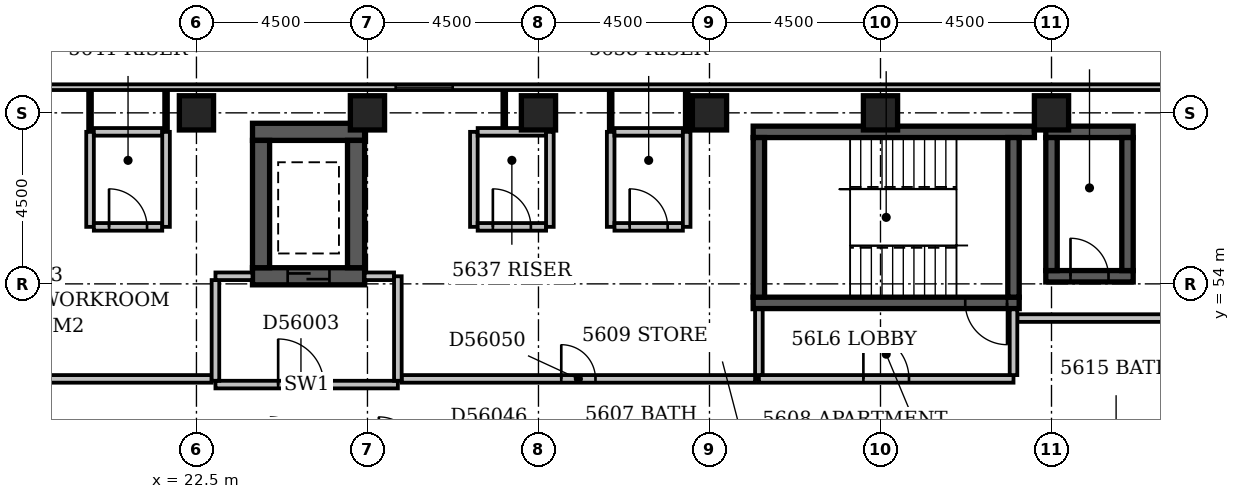
"""IFC4 building model, lengths in metres.
Left out: names, types, materials, properties, quantities, classifications, styles, units other than length and angle.
Written with IfcOpenShell. Run it as: python <this file> out.ifc"""

import sys

from ifc_helpers import new_model, si_unit, direction, frame, frame_2d, origin, origin_2d, place, context, subcontext, project, spatial, rectangle, extrude, element, fill, save


model = new_model("IFC4")
c1 = context("Model", 3, precision=1e-05, world=origin(), true_north=direction((0.0, 1.0)))
c2 = subcontext(c1, "Body", "Model", "MODEL_VIEW")
j1 = project(units=[si_unit("LENGTHUNIT", "METRE"), si_unit("PLANEANGLEUNIT", "RADIAN")], contexts=[c1])
p1 = place(None, origin())
s1 = spatial("IfcSite", under=j1, at=p1, CompositionType="ELEMENT")
p2 = place(p1, origin())
s2 = spatial("IfcBuilding", under=s1, at=p2, CompositionType="ELEMENT")
p3 = place(p2, frame((0.0, 0.0, 218.6)))
s3 = spatial("IfcBuildingStorey", under=s2, at=p3, CompositionType="ELEMENT", Elevation=218.6)
p4 = place(p3, frame((23.975, 54.2, -0.3), z_axis=(0.0, 0.0, 1.0), x_axis=(1.0, 0.0, 0.0)))
e1 = element("IfcWall", 1, at=p4, inside=s3, PredefinedType="SHEAR", context=c2, shape_type="SweptSolid", body=[
    extrude(rectangle(XDim=2.95, YDim=0.45, at=frame_2d((1.475, 0.0))), origin(), (0.0, 0.0, 1.0), 3.6),
])
p5 = place(p4, frame((0.925, 0.0, 0.3)))
e2 = element("IfcOpeningElement", 2, at=p5, cuts=e1, PredefinedType="OPENING", context=c2, shape_type="SweptSolid", body=[
    extrude(rectangle(XDim=1.1, YDim=2.1, at=frame_2d((0.55, 1.05))), frame((0.0, 0.237, 0.0), z_axis=(0.0, -1.0, 0.0), x_axis=(1.0, 0.0, 0.0)), (0.0, 0.0, 1.0), 0.474),
])
p6 = place(p3, frame((23.975, 58.0, -0.3), z_axis=(0.0, 0.0, 1.0), x_axis=(1.0, 0.0, 0.0)))
e3 = element("IfcWall", 3, at=p6, inside=s3, PredefinedType="SHEAR", context=c2, shape_type="SweptSolid", body=[
    extrude(rectangle(XDim=2.95, YDim=0.45, at=frame_2d((1.475, 0.0))), origin(), (0.0, 0.0, 1.0), 3.6),
])
for number, where, z_axis, x_axis in (
    (4, (24.2, 54.425, -0.3), (0.0, 0.0, 1.0), (0.0, 1.0, 0.0)),
    (5, (26.7, 54.425, -0.3), (0.0, 0.0, 1.0), (0.0, 1.0, 0.0)),
):
    element("IfcWall", number, at=place(p3, frame(where, z_axis=z_axis, x_axis=x_axis)), inside=s3, PredefinedType="SHEAR", context=c2, shape_type="SweptSolid", body=[
        extrude(rectangle(XDim=3.35, YDim=0.45, at=frame_2d((1.675, 0.0))), origin(), (0.0, 0.0, 1.0), 3.6),
    ])
p7 = place(p3, frame((37.15, 53.5, -0.3), z_axis=(0.0, 0.0, 1.0), x_axis=(1.0, 0.0, 0.0)))
e6 = element("IfcWall", 6, at=p7, inside=s3, PredefinedType="SHEAR", context=c2, shape_type="SweptSolid", body=[
    extrude(rectangle(XDim=7.0, YDim=0.3, at=frame_2d((3.5, 0.0))), origin(), (0.0, 0.0, 1.0), 3.6),
])
p8 = place(p7, frame((5.58, 0.0, 0.3)))
e7 = element("IfcOpeningElement", 7, at=p8, cuts=e6, PredefinedType="OPENING", context=c2, shape_type="SweptSolid", body=[
    extrude(rectangle(XDim=1.1, YDim=2.1, at=frame_2d((0.55, 1.05))), frame((0.0, 0.162, 0.0), z_axis=(0.0, -1.0, 0.0), x_axis=(1.0, 0.0, 0.0)), (0.0, 0.0, 1.0), 0.324),
])
p9 = place(p3, frame((37.15, 58.0, -0.3), z_axis=(0.0, 0.0, 1.0), x_axis=(1.0, 0.0, 0.0)))
e8 = element("IfcWall", 8, at=p9, inside=s3, PredefinedType="SHEAR", context=c2, shape_type="SweptSolid", body=[
    extrude(rectangle(XDim=7.4, YDim=0.3, at=frame_2d((3.7, 0.0))), origin(), (0.0, 0.0, 1.0), 3.6),
])
for number, where, z_axis, x_axis in (
    (9, (37.3, 53.65, -0.3), (0.0, 0.0, 1.0), (0.0, 1.0, 0.0)),
    (10, (44.0, 53.65, -0.3), (0.0, 0.0, 1.0), (0.0, 1.0, 0.0)),
):
    element("IfcWall", number, at=place(p3, frame(where, z_axis=z_axis, x_axis=x_axis)), inside=s3, PredefinedType="SHEAR", context=c2, shape_type="SweptSolid", body=[
        extrude(rectangle(XDim=4.2, YDim=0.3, at=frame_2d((2.1, 0.0))), origin(), (0.0, 0.0, 1.0), 3.6),
    ])
p10 = place(p3, frame((44.85, 54.2, -0.3), z_axis=(0.0, 0.0, 1.0), x_axis=(1.0, 0.0, 0.0)))
e11 = element("IfcWall", 11, at=p10, inside=s3, PredefinedType="SHEAR", context=c2, shape_type="SweptSolid", body=[
    extrude(rectangle(XDim=2.3, YDim=0.3, at=frame_2d((1.15, 0.0))), origin(), (0.0, 0.0, 1.0), 3.6),
])
p11 = place(p10, frame((0.65, 0.0, 0.3)))
e12 = element("IfcOpeningElement", 12, at=p11, cuts=e11, PredefinedType="OPENING", context=c2, shape_type="SweptSolid", body=[
    extrude(rectangle(XDim=1.0, YDim=2.1, at=frame_2d((0.5, 1.05))), frame((0.0, 0.162, 0.0), z_axis=(0.0, -1.0, 0.0), x_axis=(1.0, 0.0, 0.0)), (0.0, 0.0, 1.0), 0.324),
])
p12 = place(p3, frame((44.85, 58.0, -0.3), z_axis=(0.0, 0.0, 1.0), x_axis=(1.0, 0.0, 0.0)))
e13 = element("IfcWall", 13, at=p12, inside=s3, PredefinedType="SHEAR", context=c2, shape_type="SweptSolid", body=[
    extrude(rectangle(XDim=2.3, YDim=0.3, at=frame_2d((1.15, 0.0))), origin(), (0.0, 0.0, 1.0), 3.6),
])
for number, where, z_axis, x_axis in (
    (14, (45.0, 54.35, -0.3), (0.0, 0.0, 1.0), (0.0, 1.0, 0.0)),
    (15, (47.0, 54.35, -0.3), (0.0, 0.0, 1.0), (0.0, 1.0, 0.0)),
):
    element("IfcWall", number, at=place(p3, frame(where, z_axis=z_axis, x_axis=x_axis)), inside=s3, PredefinedType="SHEAR", context=c2, shape_type="SweptSolid", body=[
        extrude(rectangle(XDim=3.5, YDim=0.3, at=frame_2d((1.75, 0.0))), origin(), (0.0, 0.0, 1.0), 3.6),
    ])
for number, where, z_axis, x_axis in (
    (16, (22.5, 58.5, -0.3), (0.0, 0.0, 1.0), (1.0, 0.0, 0.0)),
    (17, (27.0, 58.5, -0.3), (0.0, 0.0, 1.0), (1.0, 0.0, 0.0)),
    (18, (31.5, 58.5, -0.3), (0.0, 0.0, 1.0), (1.0, 0.0, 0.0)),
    (19, (36.0, 58.5, -0.3), (0.0, 0.0, 1.0), (1.0, 0.0, 0.0)),
    (20, (40.5, 58.5, -0.3), (0.0, 0.0, 1.0), (1.0, 0.0, 0.0)),
    (21, (45.0, 58.5, -0.3), (0.0, 0.0, 1.0), (1.0, 0.0, 0.0)),
):
    element("IfcColumn", number, at=place(p3, frame(where, z_axis=z_axis, x_axis=x_axis)), inside=s3, PredefinedType="COLUMN", context=c2, shape_type="SweptSolid", body=[
        extrude(rectangle(XDim=0.9, YDim=0.9, at=origin_2d()), origin(), (0.0, 0.0, 1.0), 3.6),
    ])
p13 = place(p3, frame((50.1, 59.175, 0.0), z_axis=(0.0, 0.0, 1.0), x_axis=(-1.0, 0.0, 0.0)))
e22 = element("IfcWall", 22, at=p13, inside=s3, PredefinedType="STANDARD", context=c2, shape_type="SweptSolid", body=[
    extrude(rectangle(XDim=50.85, YDim=0.15, at=frame_2d((25.425, 0.0))), origin(), (0.0, 0.0, 1.0), 2.7),
])
p14 = place(p13, frame((20.857, 0.0, 0.6)))
e23 = element("IfcOpeningElement", 23, at=p14, cuts=e22, PredefinedType="OPENING", context=c2, shape_type="SweptSolid", body=[
    extrude(rectangle(XDim=1.5, YDim=1.8, at=frame_2d((0.75, 0.9))), frame((0.0, 0.087, 0.0), z_axis=(0.0, -1.0, 0.0), x_axis=(1.0, 0.0, 0.0)), (0.0, 0.0, 1.0), 0.174),
])
p15 = place(p3, frame((23.0, 51.35, 0.0), z_axis=(0.0, 0.0, 1.0), x_axis=(1.0, 0.0, 0.0)))
e24 = element("IfcWall", 24, at=p15, inside=s3, PredefinedType="PARTITIONING", context=c2, shape_type="SweptSolid", body=[
    extrude(rectangle(XDim=4.8, YDim=0.2, at=frame_2d((2.4, 0.0))), origin(), (0.0, 0.0, 1.0), 3.3),
])
p16 = place(p15, frame((1.65, 0.0, 0.0)))
e25 = element("IfcOpeningElement", 25, at=p16, cuts=e24, PredefinedType="OPENING", context=c2, shape_type="SweptSolid", body=[
    extrude(rectangle(XDim=1.2, YDim=2.1, at=frame_2d((0.6, 1.05))), frame((0.0, 0.112, 0.0), z_axis=(0.0, -1.0, 0.0), x_axis=(1.0, 0.0, 0.0)), (0.0, 0.0, 1.0), 0.224),
])
p17 = place(p3, frame((27.8, 51.45, 0.0), z_axis=(0.0, 0.0, 1.0), x_axis=(0.0, 1.0, 0.0)))
e26 = element("IfcWall", 26, at=p17, inside=s3, PredefinedType="PARTITIONING", context=c2, shape_type="SweptSolid", body=[
    extrude(rectangle(XDim=2.75, YDim=0.2, at=frame_2d((1.375, 0.0))), origin(), (0.0, 0.0, 1.0), 3.3),
])
p18 = place(p3, frame((23.0, 54.2, 0.0), z_axis=(0.0, 0.0, 1.0), x_axis=(1.0, 0.0, 0.0)))
e27 = element("IfcWall", 27, at=p18, inside=s3, PredefinedType="PARTITIONING", context=c2, shape_type="SweptSolid", body=[
    extrude(rectangle(XDim=0.975, YDim=0.2, at=frame_2d((0.488, 0.0))), origin(), (0.0, 0.0, 1.0), 3.3),
])
p19 = place(p3, frame((26.925, 54.2, 0.0), z_axis=(0.0, 0.0, 1.0), x_axis=(1.0, 0.0, 0.0)))
e28 = element("IfcWall", 28, at=p19, inside=s3, PredefinedType="PARTITIONING", context=c2, shape_type="SweptSolid", body=[
    extrude(rectangle(XDim=0.775, YDim=0.2, at=frame_2d((0.387, 0.0))), origin(), (0.0, 0.0, 1.0), 3.3),
])
p20 = place(p3, frame((23.0, 51.45, 0.0), z_axis=(0.0, 0.0, 1.0), x_axis=(0.0, 1.0, 0.0)))
e29 = element("IfcWall", 29, at=p20, inside=s3, PredefinedType="PARTITIONING", context=c2, shape_type="SweptSolid", body=[
    extrude(rectangle(XDim=2.65, YDim=0.2, at=frame_2d((1.325, 0.0))), origin(), (0.0, 0.0, 1.0), 3.3),
])
p21 = place(p3, frame((37.3, 51.5, 0.0), z_axis=(0.0, 0.0, 1.0), x_axis=(1.0, 0.0, 0.0)))
e30 = element("IfcWall", 30, at=p21, inside=s3, PredefinedType="PARTITIONING", context=c2, shape_type="SweptSolid", body=[
    extrude(rectangle(XDim=6.7, YDim=0.2, at=frame_2d((3.35, 0.0))), origin(), (0.0, 0.0, 1.0), 3.3),
])
p22 = place(p21, frame((2.75, 0.0, 0.0)))
e31 = element("IfcOpeningElement", 31, at=p22, cuts=e30, PredefinedType="OPENING", context=c2, shape_type="SweptSolid", body=[
    extrude(rectangle(XDim=1.2, YDim=2.1, at=frame_2d((0.6, 1.05))), frame((0.0, 0.112, 0.0), z_axis=(0.0, -1.0, 0.0), x_axis=(1.0, 0.0, 0.0)), (0.0, 0.0, 1.0), 0.224),
])
for number, where, z_axis, x_axis in (
    (32, (44.0, 51.6, 0.0), (0.0, 0.0, 1.0), (0.0, 1.0, 0.0)),
    (33, (37.3, 51.6, 0.0), (0.0, 0.0, 1.0), (0.0, 1.0, 0.0)),
):
    element("IfcWall", number, at=place(p3, frame(where, z_axis=z_axis, x_axis=x_axis)), inside=s3, PredefinedType="PARTITIONING", context=c2, shape_type="SweptSolid", body=[
        extrude(rectangle(XDim=1.73, YDim=0.2, at=frame_2d((0.865, 0.0))), origin(), (0.0, 0.0, 1.0), 3.3),
    ])
p23 = place(p3, frame((7.6, 51.5, 0.0), z_axis=(0.0, 0.0, 1.0), x_axis=(1.0, 0.0, 0.0)))
e34 = element("IfcWall", 34, at=p23, inside=s3, PredefinedType="PARTITIONING", context=c2, shape_type="SweptSolid", body=[
    extrude(rectangle(XDim=15.3, YDim=0.2, at=frame_2d((7.65, 0.0))), origin(), (0.0, 0.0, 1.0), 3.3),
])
p24 = place(p23, frame((7.2, 0.0, 0.0)))
e35 = element("IfcOpeningElement", 35, at=p24, cuts=e34, PredefinedType="OPENING", context=c2, shape_type="SweptSolid", body=[
    extrude(rectangle(XDim=0.9, YDim=2.1, at=frame_2d((0.45, 1.05))), frame((0.0, 0.112, 0.0), z_axis=(0.0, -1.0, 0.0), x_axis=(1.0, 0.0, 0.0)), (0.0, 0.0, 1.0), 0.224),
])
p25 = place(p3, frame((27.9, 51.5, 0.0), z_axis=(0.0, 0.0, 1.0), x_axis=(1.0, 0.0, 0.0)))
e36 = element("IfcWall", 36, at=p25, inside=s3, PredefinedType="PARTITIONING", context=c2, shape_type="SweptSolid", body=[
    extrude(rectangle(XDim=9.3, YDim=0.2, at=frame_2d((4.65, 0.0))), origin(), (0.0, 0.0, 1.0), 3.3),
])
p26 = place(p25, frame((4.2, 0.0, 0.0)))
e37 = element("IfcOpeningElement", 37, at=p26, cuts=e36, PredefinedType="OPENING", context=c2, shape_type="SweptSolid", body=[
    extrude(rectangle(XDim=0.9, YDim=2.1, at=frame_2d((0.45, 1.05))), frame((0.0, 0.112, 0.0), z_axis=(0.0, -1.0, 0.0), x_axis=(1.0, 0.0, 0.0)), (0.0, 0.0, 1.0), 0.224),
])
p27 = place(p3, frame((44.1, 53.1, 0.0), z_axis=(0.0, 0.0, 1.0), x_axis=(1.0, 0.0, 0.0)))
e38 = element("IfcWall", 38, at=p27, inside=s3, PredefinedType="PARTITIONING", context=c2, shape_type="SweptSolid", body=[
    extrude(rectangle(XDim=10.5, YDim=0.2, at=frame_2d((5.25, 0.0))), origin(), (0.0, 0.0, 1.0), 3.3),
])
p28 = place(p27, frame((4.45, 0.0, 0.0)))
e39 = element("IfcOpeningElement", 39, at=p28, cuts=e38, PredefinedType="OPENING", context=c2, shape_type="SweptSolid", body=[
    extrude(rectangle(XDim=0.9, YDim=2.1, at=frame_2d((0.45, 1.05))), frame((0.0, 0.112, 0.0), z_axis=(0.0, -1.0, 0.0), x_axis=(1.0, 0.0, 0.0)), (0.0, 0.0, 1.0), 0.224),
])
p29 = place(p3, frame((19.7, 55.5, 0.0), z_axis=(0.0, 0.0, 1.0), x_axis=(0.0, 1.0, 0.0)))
e40 = element("IfcWall", 40, at=p29, inside=s3, PredefinedType="PARTITIONING", context=c2, shape_type="SweptSolid", body=[
    extrude(rectangle(XDim=2.5, YDim=0.2, at=frame_2d((1.25, 0.0))), origin(), (0.0, 0.0, 1.0), 3.3),
])
p30 = place(p3, frame((19.8, 55.5, 0.0), z_axis=(0.0, 0.0, 1.0), x_axis=(1.0, 0.0, 0.0)))
e41 = element("IfcWall", 41, at=p30, inside=s3, PredefinedType="PARTITIONING", context=c2, shape_type="SweptSolid", body=[
    extrude(rectangle(XDim=1.8, YDim=0.2, at=frame_2d((0.9, 0.0))), origin(), (0.0, 0.0, 1.0), 3.3),
])
p31 = place(p30, frame((0.4, 0.0, 0.0)))
e42 = element("IfcOpeningElement", 42, at=p31, cuts=e41, PredefinedType="OPENING", context=c2, shape_type="SweptSolid", body=[
    extrude(rectangle(XDim=1.0, YDim=2.1, at=frame_2d((0.5, 1.05))), frame((0.0, 0.112, 0.0), z_axis=(0.0, -1.0, 0.0), x_axis=(1.0, 0.0, 0.0)), (0.0, 0.0, 1.0), 0.224),
])
for number, where, z_axis, x_axis in (
    (43, (21.7, 55.5, 0.0), (0.0, 0.0, 1.0), (0.0, 1.0, 0.0)),
    (44, (29.8, 55.5, 0.0), (0.0, 0.0, 1.0), (0.0, 1.0, 0.0)),
):
    element("IfcWall", number, at=place(p3, frame(where, z_axis=z_axis, x_axis=x_axis)), inside=s3, PredefinedType="PARTITIONING", context=c2, shape_type="SweptSolid", body=[
        extrude(rectangle(XDim=2.5, YDim=0.2, at=frame_2d((1.25, 0.0))), origin(), (0.0, 0.0, 1.0), 3.3),
    ])
p32 = place(p3, frame((29.9, 55.5, 0.0), z_axis=(0.0, 0.0, 1.0), x_axis=(1.0, 0.0, 0.0)))
e45 = element("IfcWall", 45, at=p32, inside=s3, PredefinedType="PARTITIONING", context=c2, shape_type="SweptSolid", body=[
    extrude(rectangle(XDim=1.8, YDim=0.2, at=frame_2d((0.9, 0.0))), origin(), (0.0, 0.0, 1.0), 3.3),
])
p33 = place(p32, frame((0.4, 0.0, 0.0)))
e46 = element("IfcOpeningElement", 46, at=p33, cuts=e45, PredefinedType="OPENING", context=c2, shape_type="SweptSolid", body=[
    extrude(rectangle(XDim=1.0, YDim=2.1, at=frame_2d((0.5, 1.05))), frame((0.0, 0.112, 0.0), z_axis=(0.0, -1.0, 0.0), x_axis=(1.0, 0.0, 0.0)), (0.0, 0.0, 1.0), 0.224),
])
for number, where, z_axis, x_axis in (
    (47, (31.8, 55.5, 0.0), (0.0, 0.0, 1.0), (0.0, 1.0, 0.0)),
    (48, (33.4, 55.5, 0.0), (0.0, 0.0, 1.0), (0.0, 1.0, 0.0)),
):
    element("IfcWall", number, at=place(p3, frame(where, z_axis=z_axis, x_axis=x_axis)), inside=s3, PredefinedType="PARTITIONING", context=c2, shape_type="SweptSolid", body=[
        extrude(rectangle(XDim=2.5, YDim=0.2, at=frame_2d((1.25, 0.0))), origin(), (0.0, 0.0, 1.0), 3.3),
    ])
p34 = place(p3, frame((33.5, 55.5, 0.0), z_axis=(0.0, 0.0, 1.0), x_axis=(1.0, 0.0, 0.0)))
e49 = element("IfcWall", 49, at=p34, inside=s3, PredefinedType="PARTITIONING", context=c2, shape_type="SweptSolid", body=[
    extrude(rectangle(XDim=1.8, YDim=0.2, at=frame_2d((0.9, 0.0))), origin(), (0.0, 0.0, 1.0), 3.3),
])
p35 = place(p34, frame((0.4, 0.0, 0.0)))
e50 = element("IfcOpeningElement", 50, at=p35, cuts=e49, PredefinedType="OPENING", context=c2, shape_type="SweptSolid", body=[
    extrude(rectangle(XDim=1.0, YDim=2.1, at=frame_2d((0.5, 1.05))), frame((0.0, 0.112, 0.0), z_axis=(0.0, -1.0, 0.0), x_axis=(1.0, 0.0, 0.0)), (0.0, 0.0, 1.0), 0.224),
])
p36 = place(p3, frame((35.4, 55.5, 0.0), z_axis=(0.0, 0.0, 1.0), x_axis=(0.0, 1.0, 0.0)))
e51 = element("IfcWall", 51, at=p36, inside=s3, PredefinedType="PARTITIONING", context=c2, shape_type="SweptSolid", body=[
    extrude(rectangle(XDim=2.5, YDim=0.2, at=frame_2d((1.25, 0.0))), origin(), (0.0, 0.0, 1.0), 2.4),
])
p37 = place(p3, frame((19.7, 58.0, 0.0), z_axis=(0.0, 0.0, 1.0), x_axis=(0.0, 1.0, 0.0)))
e52 = element("IfcWall", 52, at=p37, inside=s3, PredefinedType="PARTITIONING", context=c2, shape_type="SweptSolid", body=[
    extrude(rectangle(XDim=1.1, YDim=0.1, at=frame_2d((0.55, 0.0))), origin(), (0.0, 0.0, 1.0), 3.3),
])
p38 = place(p3, frame((19.8, 58.0, 0.0), z_axis=(0.0, 0.0, 1.0), x_axis=(1.0, 0.0, 0.0)))
e53 = element("IfcWall", 53, at=p38, inside=s3, PredefinedType="PARTITIONING", context=c2, shape_type="SweptSolid", body=[
    extrude(rectangle(XDim=1.8, YDim=0.2, at=frame_2d((0.9, 0.0))), origin(), (0.0, 0.0, 1.0), 3.3),
])
p39 = place(p3, frame((21.7, 58.0, 0.0), z_axis=(0.0, 0.0, 1.0), x_axis=(0.0, 1.0, 0.0)))
e54 = element("IfcWall", 54, at=p39, inside=s3, PredefinedType="PARTITIONING", context=c2, shape_type="SweptSolid", body=[
    extrude(rectangle(XDim=1.1, YDim=0.1, at=frame_2d((0.55, 0.0))), origin(), (0.0, 0.0, 1.0), 3.3),
])
p40 = place(p3, frame((29.9, 58.0, 0.0), z_axis=(0.0, 0.0, 1.0), x_axis=(1.0, 0.0, 0.0)))
e55 = element("IfcWall", 55, at=p40, inside=s3, PredefinedType="PARTITIONING", context=c2, shape_type="SweptSolid", body=[
    extrude(rectangle(XDim=1.8, YDim=0.2, at=frame_2d((0.9, 0.0))), origin(), (0.0, 0.0, 1.0), 3.3),
])
p41 = place(p3, frame((33.4, 58.0, 0.0), z_axis=(0.0, 0.0, 1.0), x_axis=(0.0, 1.0, 0.0)))
e56 = element("IfcWall", 56, at=p41, inside=s3, PredefinedType="PARTITIONING", context=c2, shape_type="SweptSolid", body=[
    extrude(rectangle(XDim=1.1, YDim=0.1, at=frame_2d((0.55, 0.0))), origin(), (0.0, 0.0, 1.0), 3.3),
])
p42 = place(p3, frame((33.5, 58.0, 0.0), z_axis=(0.0, 0.0, 1.0), x_axis=(1.0, 0.0, 0.0)))
e57 = element("IfcWall", 57, at=p42, inside=s3, PredefinedType="PARTITIONING", context=c2, shape_type="SweptSolid", body=[
    extrude(rectangle(XDim=1.8, YDim=0.2, at=frame_2d((0.9, 0.0))), origin(), (0.0, 0.0, 1.0), 3.3),
])
p43 = place(p3, frame((35.4, 58.0, 0.0), z_axis=(0.0, 0.0, 1.0), x_axis=(0.0, 1.0, 0.0)))
e58 = element("IfcWall", 58, at=p43, inside=s3, PredefinedType="PARTITIONING", context=c2, shape_type="SweptSolid", body=[
    extrude(rectangle(XDim=1.1, YDim=0.1, at=frame_2d((0.55, 0.0))), origin(), (0.0, 0.0, 1.0), 2.4),
])
p44 = place(p3, frame((30.6, 58.1, 0.0), z_axis=(0.0, 0.0, 1.0), x_axis=(0.0, 1.0, 0.0)))
e59 = element("IfcWall", 59, at=p44, inside=s3, PredefinedType="PARTITIONING", context=c2, shape_type="SweptSolid", body=[
    extrude(rectangle(XDim=1.0, YDim=0.1, at=frame_2d((0.5, 0.0))), origin(), (0.0, 0.0, 1.0), 3.3),
])
p45 = place(p14, origin())
e60 = element("IfcWindow", 60, at=p45, inside=s3, PartitioningType="SINGLE_PANEL", PredefinedType="WINDOW", context=c2, shape_type="SweptSolid", body=[
    extrude(rectangle(XDim=1.5, YDim=1.8, at=frame_2d((0.75, 0.9))), frame((0.0, 0.03, 0.0), z_axis=(0.0, -1.0, 0.0), x_axis=(1.0, 0.0, 0.0)), (0.0, 0.0, 1.0), 0.06),
])
fill(e23, e60)
p46 = place(p16, origin())
e61 = element("IfcDoor", 61, at=p46, inside=s3, OperationType="SINGLE_SWING_LEFT", PredefinedType="DOOR", context=c2, shape_type="SweptSolid", body=[
    extrude(rectangle(XDim=1.2, YDim=2.1, at=frame_2d((0.6, 1.05))), frame((0.0, 0.025, 0.0), z_axis=(0.0, -1.0, 0.0), x_axis=(1.0, 0.0, 0.0)), (0.0, 0.0, 1.0), 0.05),
])
fill(e25, e61)
p47 = place(p5, origin())
e62 = element("IfcDoor", 62, at=p47, inside=s3, OperationType="SLIDING_TO_LEFT", PredefinedType="DOOR", context=c2, shape_type="SweptSolid", body=[
    extrude(rectangle(XDim=1.1, YDim=2.1, at=frame_2d((0.55, 1.05))), frame((0.0, 0.025, 0.0), z_axis=(0.0, -1.0, 0.0), x_axis=(1.0, 0.0, 0.0)), (0.0, 0.0, 1.0), 0.05),
])
fill(e2, e62)
p48 = place(p22, origin())
e63 = element("IfcDoor", 63, at=p48, inside=s3, OperationType="SINGLE_SWING_LEFT", PredefinedType="DOOR", context=c2, shape_type="SweptSolid", body=[
    extrude(rectangle(XDim=1.2, YDim=2.1, at=frame_2d((0.6, 1.05))), frame((0.0, 0.025, 0.0), z_axis=(0.0, -1.0, 0.0), x_axis=(1.0, 0.0, 0.0)), (0.0, 0.0, 1.0), 0.05),
])
fill(e31, e63)
p49 = place(p11, origin())
e64 = element("IfcDoor", 64, at=p49, inside=s3, OperationType="SINGLE_SWING_LEFT", PredefinedType="DOOR", context=c2, shape_type="SweptSolid", body=[
    extrude(rectangle(XDim=1.0, YDim=2.1, at=frame_2d((0.5, 1.05))), frame((0.0, 0.025, 0.0), z_axis=(0.0, -1.0, 0.0), x_axis=(1.0, 0.0, 0.0)), (0.0, 0.0, 1.0), 0.05),
])
fill(e12, e64)
p50 = place(p8, origin())
e65 = element("IfcDoor", 65, at=p50, inside=s3, OperationType="SINGLE_SWING_RIGHT", PredefinedType="DOOR", context=c2, shape_type="SweptSolid", body=[
    extrude(rectangle(XDim=1.1, YDim=2.1, at=frame_2d((0.55, 1.05))), frame((0.0, 0.025, 0.0), z_axis=(0.0, -1.0, 0.0), x_axis=(1.0, 0.0, 0.0)), (0.0, 0.0, 1.0), 0.05),
])
fill(e7, e65)
p51 = place(p26, origin())
e66 = element("IfcDoor", 66, at=p51, inside=s3, OperationType="SINGLE_SWING_LEFT", PredefinedType="DOOR", context=c2, shape_type="SweptSolid", body=[
    extrude(rectangle(XDim=0.9, YDim=2.1, at=frame_2d((0.45, 1.05))), frame((0.0, 0.025, 0.0), z_axis=(0.0, -1.0, 0.0), x_axis=(1.0, 0.0, 0.0)), (0.0, 0.0, 1.0), 0.05),
])
fill(e37, e66)
p52 = place(p31, origin())
e67 = element("IfcDoor", 67, at=p52, inside=s3, OperationType="SINGLE_SWING_LEFT", PredefinedType="DOOR", context=c2, shape_type="SweptSolid", body=[
    extrude(rectangle(XDim=1.0, YDim=2.1, at=frame_2d((0.5, 1.05))), frame((0.0, 0.025, 0.0), z_axis=(0.0, -1.0, 0.0), x_axis=(1.0, 0.0, 0.0)), (0.0, 0.0, 1.0), 0.05),
])
fill(e42, e67)
p53 = place(p33, origin())
e68 = element("IfcDoor", 68, at=p53, inside=s3, OperationType="SINGLE_SWING_LEFT", PredefinedType="DOOR", context=c2, shape_type="SweptSolid", body=[
    extrude(rectangle(XDim=1.0, YDim=2.1, at=frame_2d((0.5, 1.05))), frame((0.0, 0.025, 0.0), z_axis=(0.0, -1.0, 0.0), x_axis=(1.0, 0.0, 0.0)), (0.0, 0.0, 1.0), 0.05),
])
fill(e46, e68)
p54 = place(p35, origin())
e69 = element("IfcDoor", 69, at=p54, inside=s3, OperationType="SINGLE_SWING_LEFT", PredefinedType="DOOR", context=c2, shape_type="SweptSolid", body=[
    extrude(rectangle(XDim=1.0, YDim=2.1, at=frame_2d((0.5, 1.05))), frame((0.0, 0.025, 0.0), z_axis=(0.0, -1.0, 0.0), x_axis=(1.0, 0.0, 0.0)), (0.0, 0.0, 1.0), 0.05),
])
fill(e50, e69)
save(model, sys.argv[1])
